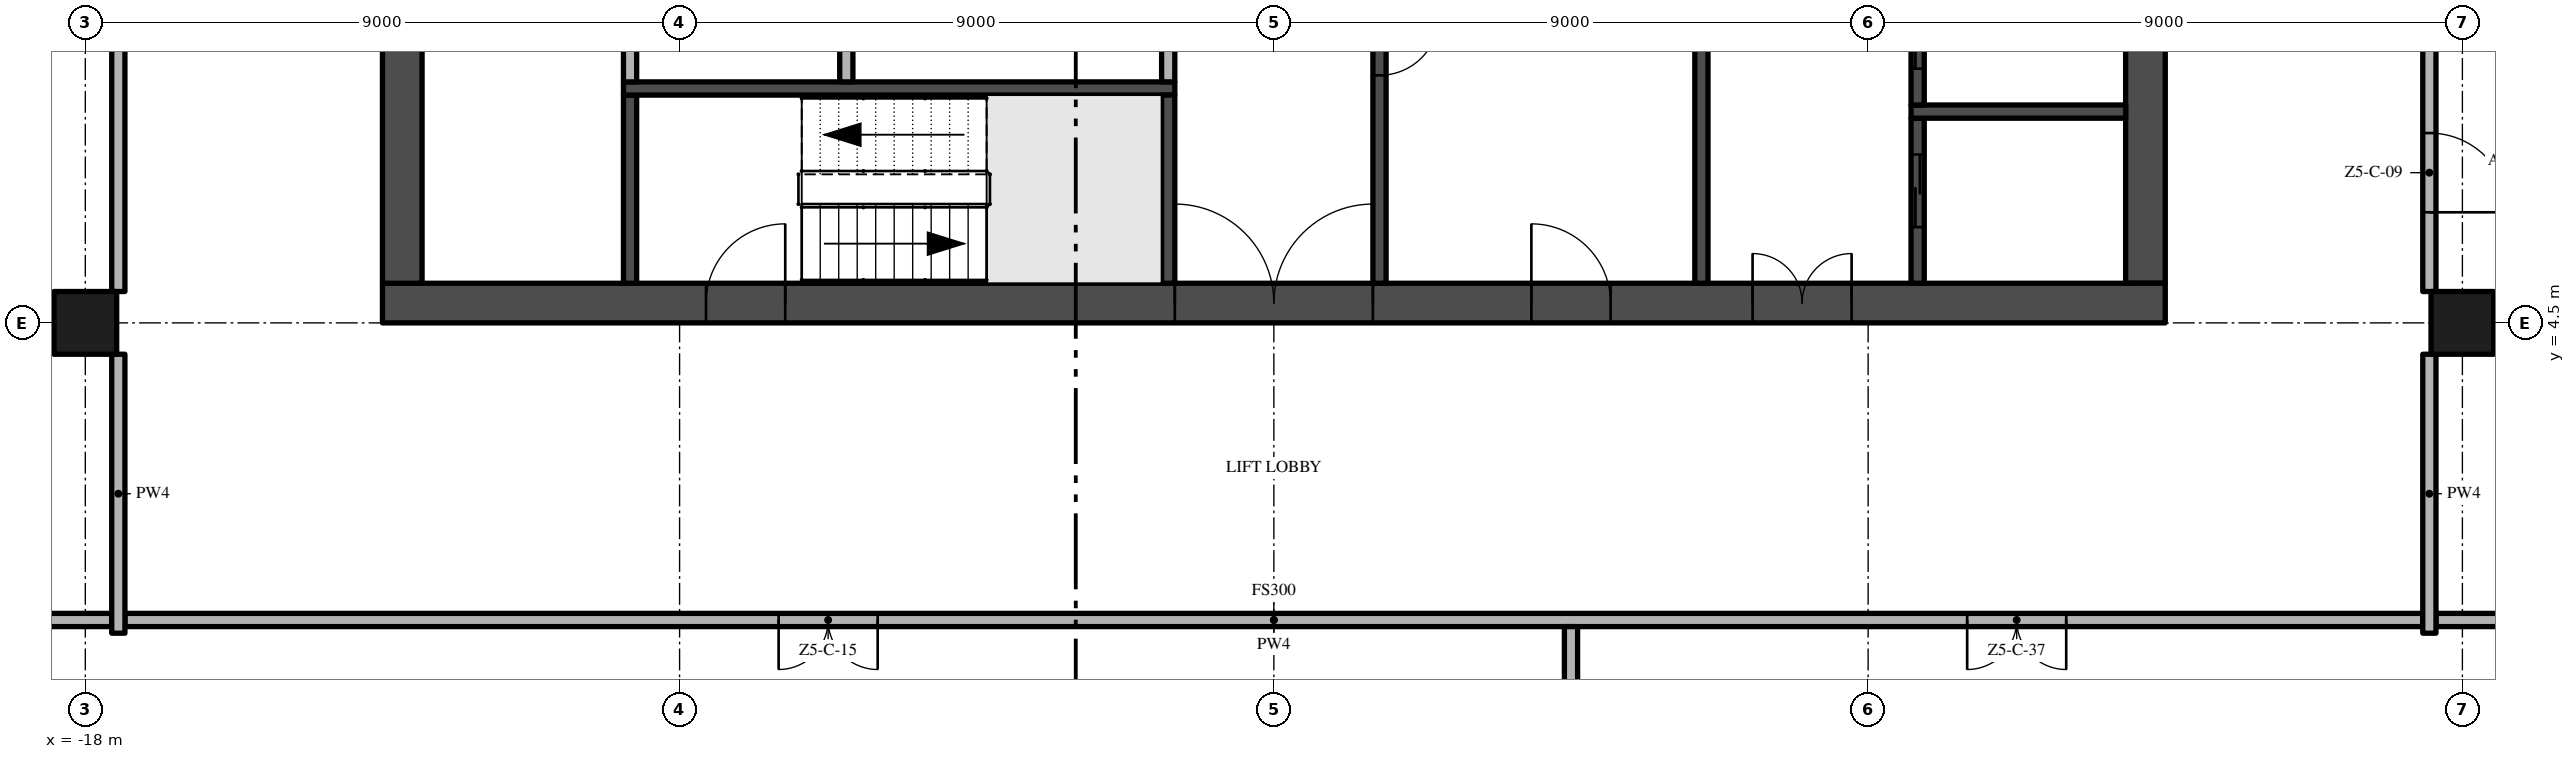
"""IFC4 building model, lengths in metres.
Left out: names, types, materials, properties, quantities, classifications, styles, units other than length and angle.
Written with IfcOpenShell. Run it as: python <this file> out.ifc"""

import sys

from ifc_helpers import new_model, si_unit, direction, frame, frame_2d, origin, origin_2d, place, context, subcontext, project, spatial, rectangle, extrude, element, fill, save


model = new_model("IFC4")
c1 = context("Model", 3, precision=1e-05, world=origin(), true_north=direction((0.0, 1.0)))
c2 = subcontext(c1, "Body", "Model", "MODEL_VIEW")
j1 = project(units=[si_unit("LENGTHUNIT", "METRE"), si_unit("PLANEANGLEUNIT", "RADIAN")], contexts=[c1])
p1 = place(None, origin())
s1 = spatial("IfcSite", under=j1, at=p1, CompositionType="ELEMENT")
p2 = place(p1, origin())
s2 = spatial("IfcBuilding", under=s1, at=p2, CompositionType="ELEMENT")
p3 = place(p2, frame((0.0, 0.0, 261.6)))
s3 = spatial("IfcBuildingStorey", under=s2, at=p3, CompositionType="ELEMENT", Elevation=261.6)
p4 = place(p3, frame((-13.5, 4.8, -0.3), z_axis=(0.0, 0.0, 1.0), x_axis=(1.0, 0.0, 0.0)))
e1 = element("IfcWall", 1, at=p4, inside=s3, PredefinedType="SHEAR", context=c2, shape_type="SweptSolid", body=[
    extrude(rectangle(XDim=27.0, YDim=0.6, at=frame_2d((13.5, 0.0))), origin(), (0.0, 0.0, 1.0), 3.8),
])
p5 = place(p4, frame((12.0, 0.0, 0.3)))
e2 = element("IfcOpeningElement", 2, at=p5, cuts=e1, PredefinedType="OPENING", context=c2, shape_type="SweptSolid", body=[
    extrude(rectangle(XDim=3.0, YDim=2.4, at=frame_2d((1.5, 1.2))), frame((0.0, 0.31, 0.0), z_axis=(0.0, -1.0, 0.0), x_axis=(1.0, 0.0, 0.0)), (0.0, 0.0, 1.0), 0.62),
])
p6 = place(p4, frame((4.9, 0.0, 0.3)))
e3 = element("IfcOpeningElement", 3, at=p6, cuts=e1, PredefinedType="OPENING", context=c2, shape_type="SweptSolid", body=[
    extrude(rectangle(XDim=1.2, YDim=2.2, at=frame_2d((0.6, 1.1))), frame((0.0, 0.31, 0.0), z_axis=(0.0, -1.0, 0.0), x_axis=(1.0, 0.0, 0.0)), (0.0, 0.0, 1.0), 0.62),
])
p7 = place(p4, frame((20.75, 0.0, 0.3)))
e4 = element("IfcOpeningElement", 4, at=p7, cuts=e1, PredefinedType="OPENING", context=c2, shape_type="SweptSolid", body=[
    extrude(rectangle(XDim=1.5, YDim=2.2, at=frame_2d((0.75, 1.1))), frame((0.0, 0.31, 0.0), z_axis=(0.0, -1.0, 0.0), x_axis=(1.0, 0.0, 0.0)), (0.0, 0.0, 1.0), 0.62),
])
p8 = place(p4, frame((17.4, 0.0, 0.3)))
e5 = element("IfcOpeningElement", 5, at=p8, cuts=e1, PredefinedType="OPENING", context=c2, shape_type="SweptSolid", body=[
    extrude(rectangle(XDim=1.2, YDim=2.2, at=frame_2d((0.6, 1.1))), frame((0.0, 0.31, 0.0), z_axis=(0.0, -1.0, 0.0), x_axis=(1.0, 0.0, 0.0)), (0.0, 0.0, 1.0), 0.62),
])
p9 = place(p3, frame((13.2, 5.1, -0.3), z_axis=(0.0, 0.0, 1.0), x_axis=(0.0, 1.0, 0.0)))
e6 = element("IfcWall", 6, at=p9, inside=s3, PredefinedType="SHEAR", context=c2, shape_type="SweptSolid", body=[
    extrude(rectangle(XDim=16.8, YDim=0.6, at=frame_2d((8.4, 0.0))), origin(), (0.0, 0.0, 1.0), 3.8),
])
p10 = place(p9, frame((6.3, 0.0, 0.3)))
e7 = element("IfcOpeningElement", 7, at=p10, cuts=e6, PredefinedType="OPENING", context=c2, shape_type="SweptSolid", body=[
    extrude(rectangle(XDim=1.2, YDim=2.2, at=frame_2d((0.6, 1.1))), frame((0.0, 0.31, 0.0), z_axis=(0.0, -1.0, 0.0), x_axis=(1.0, 0.0, 0.0)), (0.0, 0.0, 1.0), 0.62),
])
p11 = place(p3, frame((-13.2, 21.9, -0.3), z_axis=(0.0, 0.0, 1.0), x_axis=(0.0, -1.0, 0.0)))
e8 = element("IfcWall", 8, at=p11, inside=s3, PredefinedType="SHEAR", context=c2, shape_type="SweptSolid", body=[
    extrude(rectangle(XDim=16.8, YDim=0.6, at=frame_2d((8.4, 0.0))), origin(), (0.0, 0.0, 1.0), 3.8),
])
p12 = place(p11, frame((9.3, 0.0, 0.3)))
e9 = element("IfcOpeningElement", 9, at=p12, cuts=e8, PredefinedType="OPENING", context=c2, shape_type="SweptSolid", body=[
    extrude(rectangle(XDim=1.2, YDim=2.2, at=frame_2d((0.6, 1.1))), frame((0.0, 0.31, 0.0), z_axis=(0.0, -1.0, 0.0), x_axis=(1.0, 0.0, 0.0)), (0.0, 0.0, 1.0), 0.62),
])
for number, where, z_axis, x_axis in (
    (10, (-18.0, 4.5, 0.0), (0.0, 0.0, 1.0), (1.0, 0.0, 0.0)),
    (11, (18.0, 4.5, 0.0), (0.0, 0.0, 1.0), (1.0, 0.0, 0.0)),
):
    element("IfcColumn", number, at=place(p3, frame(where, z_axis=z_axis, x_axis=x_axis)), inside=s3, PredefinedType="COLUMN", context=c2, shape_type="SweptSolid", body=[
        extrude(rectangle(XDim=0.95, YDim=0.95, at=origin_2d()), origin(), (0.0, 0.0, 1.0), 3.5),
    ])
p13 = place(p3, frame((-9.75, 5.1, 0.0), z_axis=(0.0, 0.0, 1.0), x_axis=(0.0, 1.0, 0.0)))
e12 = element("IfcWall", 12, at=p13, inside=s3, PredefinedType="SHEAR", context=c2, shape_type="SweptSolid", body=[
    extrude(rectangle(XDim=2.85, YDim=0.2, at=frame_2d((1.425, 0.0))), origin(), (0.0, 0.0, 1.0), 3.5),
])
p14 = place(p3, frame((-9.85, 8.05, 0.0), z_axis=(0.0, 0.0, 1.0), x_axis=(1.0, 0.0, 0.0)))
e13 = element("IfcWall", 13, at=p14, inside=s3, PredefinedType="SHEAR", context=c2, shape_type="SweptSolid", body=[
    extrude(rectangle(XDim=8.35, YDim=0.2, at=frame_2d((4.175, 0.0))), origin(), (0.0, 0.0, 1.0), 3.5),
])
p15 = place(p3, frame((-9.75, 8.15, 0.0), z_axis=(0.0, 0.0, 1.0), x_axis=(0.0, 1.0, 0.0)))
e14 = element("IfcWall", 14, at=p15, inside=s3, PredefinedType="PARTITIONING", context=c2, shape_type="SweptSolid", body=[
    extrude(rectangle(XDim=1.85, YDim=0.2, at=frame_2d((0.925, 0.0))), origin(), (0.0, 0.0, 1.0), 3.5),
])
p16 = place(p15, frame((0.475, 0.0, 0.0)))
e15 = element("IfcOpeningElement", 15, at=p16, cuts=e14, PredefinedType="OPENING", context=c2, shape_type="SweptSolid", body=[
    extrude(rectangle(XDim=0.9, YDim=2.1, at=frame_2d((0.45, 1.05))), frame((0.0, 0.11, 0.0), z_axis=(0.0, -1.0, 0.0), x_axis=(1.0, 0.0, 0.0)), (0.0, 0.0, 1.0), 0.22),
])
p17 = place(p3, frame((-6.475, 8.15, 0.0), z_axis=(0.0, 0.0, 1.0), x_axis=(0.0, 1.0, 0.0)))
e16 = element("IfcWall", 16, at=p17, inside=s3, PredefinedType="PARTITIONING", context=c2, shape_type="SweptSolid", body=[
    extrude(rectangle(XDim=2.15, YDim=0.2, at=frame_2d((1.075, 0.0))), origin(), (0.0, 0.0, 1.0), 3.5),
])
p18 = place(p17, frame((0.625, 0.0, 0.0)))
e17 = element("IfcOpeningElement", 17, at=p18, cuts=e16, PredefinedType="OPENING", context=c2, shape_type="SweptSolid", body=[
    extrude(rectangle(XDim=0.9, YDim=2.1, at=frame_2d((0.45, 1.05))), frame((0.0, 0.11, 0.0), z_axis=(0.0, -1.0, 0.0), x_axis=(1.0, 0.0, 0.0)), (0.0, 0.0, 1.0), 0.22),
])
p19 = place(p3, frame((-1.6, 5.1, 0.0), z_axis=(0.0, 0.0, 1.0), x_axis=(0.0, 1.0, 0.0)))
e18 = element("IfcWall", 18, at=p19, inside=s3, PredefinedType="SHEAR", context=c2, shape_type="SweptSolid", body=[
    extrude(rectangle(XDim=2.85, YDim=0.2, at=frame_2d((1.425, 0.0))), origin(), (0.0, 0.0, 1.0), 3.5),
])
p20 = place(p3, frame((-1.6, 8.15, 0.0), z_axis=(0.0, 0.0, 1.0), x_axis=(0.0, 1.0, 0.0)))
e19 = element("IfcWall", 19, at=p20, inside=s3, PredefinedType="PARTITIONING", context=c2, shape_type="SweptSolid", body=[
    extrude(rectangle(XDim=2.15, YDim=0.2, at=frame_2d((1.075, 0.0))), origin(), (0.0, 0.0, 1.0), 3.5),
])
p21 = place(p20, frame((0.625, 0.0, 0.0)))
e20 = element("IfcOpeningElement", 20, at=p21, cuts=e19, PredefinedType="OPENING", context=c2, shape_type="SweptSolid", body=[
    extrude(rectangle(XDim=0.9, YDim=2.1, at=frame_2d((0.45, 1.05))), frame((0.0, 0.11, 0.0), z_axis=(0.0, -1.0, 0.0), x_axis=(1.0, 0.0, 0.0)), (0.0, 0.0, 1.0), 0.22),
])
p22 = place(p3, frame((1.6, 11.5, 0.0), z_axis=(0.0, 0.0, 1.0), x_axis=(0.0, -1.0, 0.0)))
e21 = element("IfcWall", 21, at=p22, inside=s3, PredefinedType="SHEAR", context=c2, shape_type="SweptSolid", body=[
    extrude(rectangle(XDim=6.4, YDim=0.2, at=frame_2d((3.2, 0.0))), origin(), (0.0, 0.0, 1.0), 3.5),
])
p23 = place(p22, frame((2.35, 0.0, 0.0)))
e22 = element("IfcOpeningElement", 22, at=p23, cuts=e21, PredefinedType="OPENING", context=c2, shape_type="SweptSolid", body=[
    extrude(rectangle(XDim=0.9, YDim=2.1, at=frame_2d((0.45, 1.05))), frame((0.0, 0.11, 0.0), z_axis=(0.0, -1.0, 0.0), x_axis=(1.0, 0.0, 0.0)), (0.0, 0.0, 1.0), 0.22),
])
p24 = place(p3, frame((6.475, 5.1, 0.0), z_axis=(0.0, 0.0, 1.0), x_axis=(0.0, 1.0, 0.0)))
e23 = element("IfcWall", 23, at=p24, inside=s3, PredefinedType="SHEAR", context=c2, shape_type="SweptSolid", body=[
    extrude(rectangle(XDim=6.4, YDim=0.2, at=frame_2d((3.2, 0.0))), origin(), (0.0, 0.0, 1.0), 3.5),
])
p25 = place(p3, frame((9.75, 5.1, 0.0), z_axis=(0.0, 0.0, 1.0), x_axis=(0.0, 1.0, 0.0)))
e24 = element("IfcWall", 24, at=p25, inside=s3, PredefinedType="SHEAR", context=c2, shape_type="SweptSolid", body=[
    extrude(rectangle(XDim=2.5, YDim=0.2, at=frame_2d((1.25, 0.0))), origin(), (0.0, 0.0, 1.0), 3.5),
])
p26 = place(p25, frame((0.85, 0.0, 0.0)))
e25 = element("IfcOpeningElement", 25, at=p26, cuts=e24, PredefinedType="OPENING", context=c2, shape_type="SweptSolid", body=[
    extrude(rectangle(XDim=1.1, YDim=2.1, at=frame_2d((0.55, 1.05))), frame((0.0, 0.11, 0.0), z_axis=(0.0, -1.0, 0.0), x_axis=(1.0, 0.0, 0.0)), (0.0, 0.0, 1.0), 0.22),
])
p27 = place(p3, frame((9.65, 7.7, 0.0), z_axis=(0.0, 0.0, 1.0), x_axis=(1.0, 0.0, 0.0)))
e26 = element("IfcWall", 26, at=p27, inside=s3, PredefinedType="SHEAR", context=c2, shape_type="SweptSolid", body=[
    extrude(rectangle(XDim=3.25, YDim=0.2, at=frame_2d((1.625, 0.0))), origin(), (0.0, 0.0, 1.0), 3.5),
])
p28 = place(p3, frame((9.75, 7.8, 0.0), z_axis=(0.0, 0.0, 1.0), x_axis=(0.0, 1.0, 0.0)))
e27 = element("IfcWall", 27, at=p28, inside=s3, PredefinedType="SHEAR", context=c2, shape_type="SweptSolid", body=[
    extrude(rectangle(XDim=2.2, YDim=0.2, at=frame_2d((1.1, 0.0))), origin(), (0.0, 0.0, 1.0), 3.5),
])
p29 = place(p28, frame((0.55, 0.0, 0.0)))
e28 = element("IfcOpeningElement", 28, at=p29, cuts=e27, PredefinedType="OPENING", context=c2, shape_type="SweptSolid", body=[
    extrude(rectangle(XDim=1.1, YDim=2.1, at=frame_2d((0.55, 1.05))), frame((0.0, 0.11, 0.0), z_axis=(0.0, -1.0, 0.0), x_axis=(1.0, 0.0, 0.0)), (0.0, 0.0, 1.0), 0.22),
])
p30 = place(p3, frame((17.4, 0.0, 0.0), z_axis=(0.0, 0.0, 1.0), x_axis=(-1.0, 0.0, 0.0)))
e29 = element("IfcWall", 29, at=p30, inside=s3, PredefinedType="PARTITIONING", context=c2, shape_type="SweptSolid", body=[
    extrude(rectangle(XDim=34.8, YDim=0.2, at=frame_2d((17.4, 0.0))), origin(), (0.0, 0.0, 1.0), 3.5),
])
p31 = place(p30, frame((23.4, 0.0, 0.0)))
e30 = element("IfcOpeningElement", 30, at=p31, cuts=e29, PredefinedType="OPENING", context=c2, shape_type="SweptSolid", body=[
    extrude(rectangle(XDim=1.5, YDim=2.4, at=frame_2d((0.75, 1.2))), frame((0.0, 0.11, 0.0), z_axis=(0.0, -1.0, 0.0), x_axis=(1.0, 0.0, 0.0)), (0.0, 0.0, 1.0), 0.22),
])
p32 = place(p30, frame((5.4, 0.0, 0.0)))
e31 = element("IfcOpeningElement", 31, at=p32, cuts=e29, PredefinedType="OPENING", context=c2, shape_type="SweptSolid", body=[
    extrude(rectangle(XDim=1.5, YDim=2.4, at=frame_2d((0.75, 1.2))), frame((0.0, 0.11, 0.0), z_axis=(0.0, -1.0, 0.0), x_axis=(1.0, 0.0, 0.0)), (0.0, 0.0, 1.0), 0.22),
])
for number, where, z_axis, x_axis in (
    (32, (-26.7, 0.0, 0.0), (0.0, 0.0, 1.0), (1.0, 0.0, 0.0)),
    (33, (17.6, 0.0, 0.0), (0.0, 0.0, 1.0), (1.0, 0.0, 0.0)),
):
    element("IfcWall", number, at=place(p3, frame(where, z_axis=z_axis, x_axis=x_axis)), inside=s3, PredefinedType="PARTITIONING", context=c2, shape_type="SweptSolid", body=[
        extrude(rectangle(XDim=9.1, YDim=0.2, at=frame_2d((4.55, 0.0))), origin(), (0.0, 0.0, 1.0), 3.5),
    ])
p33 = place(p3, frame((-17.5, -0.2, 0.0), z_axis=(0.0, 0.0, 1.0), x_axis=(0.0, 1.0, 0.0)))
e34 = element("IfcWall", 34, at=p33, inside=s3, PredefinedType="PARTITIONING", context=c2, shape_type="SweptSolid", body=[
    extrude(rectangle(XDim=4.225, YDim=0.2, at=frame_2d((2.112, 0.0))), origin(), (0.0, 0.0, 1.0), 3.5),
])
p34 = place(p3, frame((-17.5, 4.975, 0.0), z_axis=(0.0, 0.0, 1.0), x_axis=(0.0, 1.0, 0.0)))
e35 = element("IfcWall", 35, at=p34, inside=s3, PredefinedType="PARTITIONING", context=c2, shape_type="SweptSolid", body=[
    extrude(rectangle(XDim=8.05, YDim=0.2, at=frame_2d((4.025, 0.0))), origin(), (0.0, 0.0, 1.0), 3.5),
])
p35 = place(p3, frame((4.5, -22.2, 0.0), z_axis=(0.0, 0.0, 1.0), x_axis=(0.0, 1.0, 0.0)))
e36 = element("IfcWall", 36, at=p35, inside=s3, PredefinedType="PARTITIONING", context=c2, shape_type="SweptSolid", body=[
    extrude(rectangle(XDim=22.1, YDim=0.2, at=frame_2d((11.05, 0.0))), origin(), (0.0, 0.0, 1.0), 3.5),
])
p36 = place(p3, frame((17.5, -0.2, 0.0), z_axis=(0.0, 0.0, 1.0), x_axis=(0.0, 1.0, 0.0)))
e37 = element("IfcWall", 37, at=p36, inside=s3, PredefinedType="PARTITIONING", context=c2, shape_type="SweptSolid", body=[
    extrude(rectangle(XDim=4.225, YDim=0.2, at=frame_2d((2.112, 0.0))), origin(), (0.0, 0.0, 1.0), 3.5),
])
p37 = place(p3, frame((17.5, 13.025, 0.0), z_axis=(0.0, 0.0, 1.0), x_axis=(0.0, -1.0, 0.0)))
e38 = element("IfcWall", 38, at=p37, inside=s3, PredefinedType="PARTITIONING", context=c2, shape_type="SweptSolid", body=[
    extrude(rectangle(XDim=8.05, YDim=0.2, at=frame_2d((4.025, 0.0))), origin(), (0.0, 0.0, 1.0), 3.5),
])
p38 = place(p37, frame((5.65, 0.0, 0.0)))
e39 = element("IfcOpeningElement", 39, at=p38, cuts=e38, PredefinedType="OPENING", context=c2, shape_type="SweptSolid", body=[
    extrude(rectangle(XDim=1.2, YDim=2.4, at=frame_2d((0.6, 1.2))), frame((0.0, 0.11, 0.0), z_axis=(0.0, -1.0, 0.0), x_axis=(1.0, 0.0, 0.0)), (0.0, 0.0, 1.0), 0.22),
])
p39 = place(p5, frame((3.0, 0.0, 0.0), z_axis=(0.0, 0.0, 1.0), x_axis=(-1.0, 0.0, 0.0)))
e40 = element("IfcDoor", 40, at=p39, inside=s3, OperationType="DOUBLE_DOOR_SINGLE_SWING", PredefinedType="DOOR", context=c2, shape_type="SweptSolid", body=[
    extrude(rectangle(XDim=3.0, YDim=2.4, at=frame_2d((1.5, 1.2))), frame((0.0, 0.025, 0.0), z_axis=(0.0, -1.0, 0.0), x_axis=(1.0, 0.0, 0.0)), (0.0, 0.0, 1.0), 0.05),
])
fill(e2, e40)
p40 = place(p6, frame((1.2, 0.0, 0.0), z_axis=(0.0, 0.0, 1.0), x_axis=(-1.0, 0.0, 0.0)))
e41 = element("IfcDoor", 41, at=p40, inside=s3, OperationType="SINGLE_SWING_LEFT", PredefinedType="DOOR", context=c2, shape_type="SweptSolid", body=[
    extrude(rectangle(XDim=1.2, YDim=2.2, at=frame_2d((0.6, 1.1))), frame((0.0, 0.025, 0.0), z_axis=(0.0, -1.0, 0.0), x_axis=(1.0, 0.0, 0.0)), (0.0, 0.0, 1.0), 0.05),
])
fill(e3, e41)
p41 = place(p7, frame((1.5, 0.0, 0.0), z_axis=(0.0, 0.0, 1.0), x_axis=(-1.0, 0.0, 0.0)))
e42 = element("IfcDoor", 42, at=p41, inside=s3, OperationType="DOUBLE_DOOR_SINGLE_SWING", PredefinedType="DOOR", context=c2, shape_type="SweptSolid", body=[
    extrude(rectangle(XDim=1.5, YDim=2.2, at=frame_2d((0.75, 1.1))), frame((0.0, 0.025, 0.0), z_axis=(0.0, -1.0, 0.0), x_axis=(1.0, 0.0, 0.0)), (0.0, 0.0, 1.0), 0.05),
])
fill(e4, e42)
p42 = place(p8, frame((1.2, 0.0, 0.0), z_axis=(0.0, 0.0, 1.0), x_axis=(-1.0, 0.0, 0.0)))
e43 = element("IfcDoor", 43, at=p42, inside=s3, OperationType="SINGLE_SWING_RIGHT", PredefinedType="DOOR", context=c2, shape_type="SweptSolid", body=[
    extrude(rectangle(XDim=1.2, YDim=2.2, at=frame_2d((0.6, 1.1))), frame((0.0, 0.025, 0.0), z_axis=(0.0, -1.0, 0.0), x_axis=(1.0, 0.0, 0.0)), (0.0, 0.0, 1.0), 0.05),
])
fill(e5, e43)
p43 = place(p26, origin())
e44 = element("IfcDoor", 44, at=p43, inside=s3, OperationType="SLIDING_TO_RIGHT", PredefinedType="DOOR", context=c2, shape_type="SweptSolid", body=[
    extrude(rectangle(XDim=1.1, YDim=2.1, at=frame_2d((0.55, 1.05))), frame((0.0, 0.025, 0.0), z_axis=(0.0, -1.0, 0.0), x_axis=(1.0, 0.0, 0.0)), (0.0, 0.0, 1.0), 0.05),
])
fill(e25, e44)
p44 = place(p29, origin())
e45 = element("IfcDoor", 45, at=p44, inside=s3, OperationType="SLIDING_TO_RIGHT", PredefinedType="DOOR", context=c2, shape_type="SweptSolid", body=[
    extrude(rectangle(XDim=1.1, YDim=2.1, at=frame_2d((0.55, 1.05))), frame((0.0, 0.025, 0.0), z_axis=(0.0, -1.0, 0.0), x_axis=(1.0, 0.0, 0.0)), (0.0, 0.0, 1.0), 0.05),
])
fill(e28, e45)
p45 = place(p23, origin())
e46 = element("IfcDoor", 46, at=p45, inside=s3, OperationType="SINGLE_SWING_LEFT", PredefinedType="DOOR", context=c2, shape_type="SweptSolid", body=[
    extrude(rectangle(XDim=0.9, YDim=2.1, at=frame_2d((0.45, 1.05))), frame((0.0, 0.025, 0.0), z_axis=(0.0, -1.0, 0.0), x_axis=(1.0, 0.0, 0.0)), (0.0, 0.0, 1.0), 0.05),
])
fill(e22, e46)
p46 = place(p38, origin())
e47 = element("IfcDoor", 47, at=p46, inside=s3, OperationType="SINGLE_SWING_RIGHT", PredefinedType="DOOR", context=c2, shape_type="SweptSolid", body=[
    extrude(rectangle(XDim=1.2, YDim=2.4, at=frame_2d((0.6, 1.2))), frame((0.0, 0.025, 0.0), z_axis=(0.0, -1.0, 0.0), x_axis=(1.0, 0.0, 0.0)), (0.0, 0.0, 1.0), 0.05),
])
fill(e39, e47)
p47 = place(p31, origin())
e48 = element("IfcDoor", 48, at=p47, inside=s3, OperationType="DOUBLE_DOOR_SINGLE_SWING", PredefinedType="DOOR", context=c2, shape_type="SweptSolid", body=[
    extrude(rectangle(XDim=1.5, YDim=2.4, at=frame_2d((0.75, 1.2))), frame((0.0, 0.025, 0.0), z_axis=(0.0, -1.0, 0.0), x_axis=(1.0, 0.0, 0.0)), (0.0, 0.0, 1.0), 0.05),
])
fill(e30, e48)
p48 = place(p32, origin())
e49 = element("IfcDoor", 49, at=p48, inside=s3, OperationType="DOUBLE_DOOR_SINGLE_SWING", PredefinedType="DOOR", context=c2, shape_type="SweptSolid", body=[
    extrude(rectangle(XDim=1.5, YDim=2.4, at=frame_2d((0.75, 1.2))), frame((0.0, 0.025, 0.0), z_axis=(0.0, -1.0, 0.0), x_axis=(1.0, 0.0, 0.0)), (0.0, 0.0, 1.0), 0.05),
])
fill(e31, e49)
save(model, sys.argv[1])
